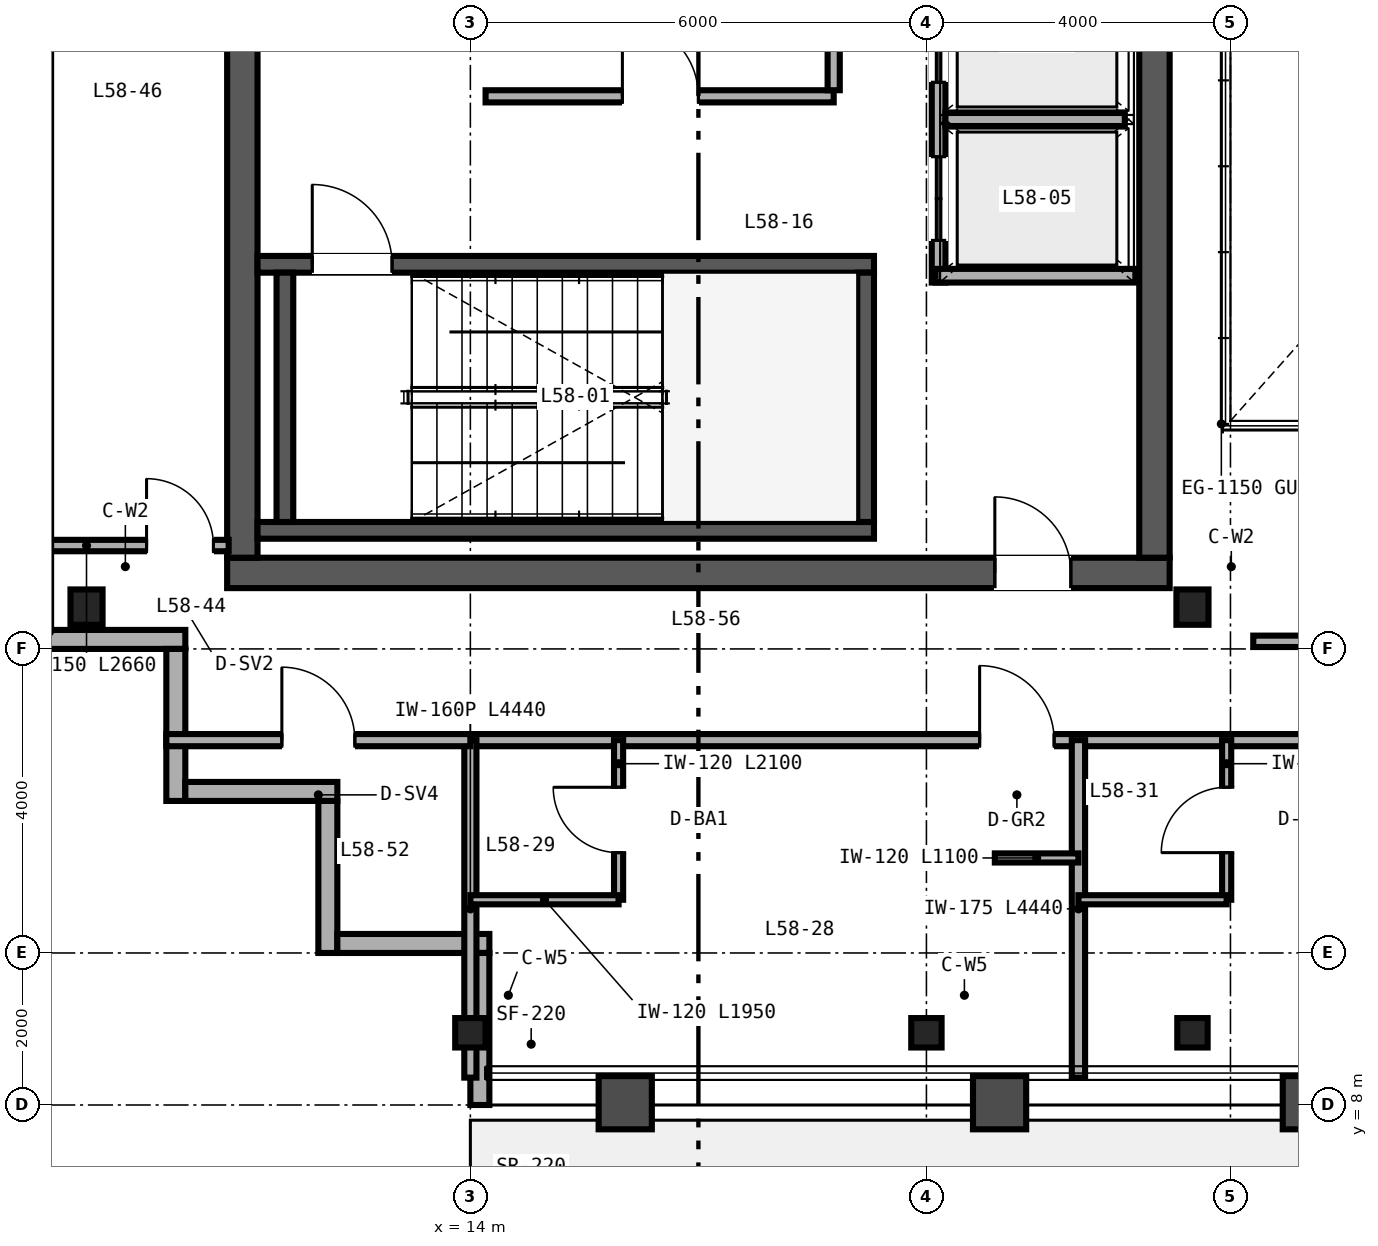
"""IFC4 building model, lengths in metres.
Left out: names, types, materials, properties, quantities, classifications, styles, units other than length and angle.
Written with IfcOpenShell. Run it as: python <this file> out.ifc"""

import sys

from ifc_helpers import new_model, si_unit, direction, frame, frame_2d, origin, origin_2d, place, context, subcontext, project, spatial, rectangle, i_section, extrude, source, transform, mapped, element, fill, save


model = new_model("IFC4")
c1 = context("Model", 3, precision=1e-05, world=origin(), true_north=direction((0.0, 1.0)))
c2 = subcontext(c1, "Body", "Model", "MODEL_VIEW")
j1 = project(units=[si_unit("LENGTHUNIT", "METRE"), si_unit("PLANEANGLEUNIT", "RADIAN")], contexts=[c1])
p1 = place(None, origin())
s1 = spatial("IfcSite", under=j1, at=p1, CompositionType="ELEMENT")
p2 = place(p1, origin())
s2 = spatial("IfcBuilding", under=s1, at=p2, CompositionType="ELEMENT")
p3 = place(p2, frame((0.0, 0.0, 232.8)))
s3 = spatial("IfcBuildingStorey", under=s2, at=p3, CompositionType="ELEMENT", Elevation=232.8)
p4 = place(p3, frame((10.8, 15.0, 0.0), z_axis=(0.0, 0.0, 1.0), x_axis=(1.0, 0.0, 0.0)))
e1 = element("IfcWall", 1, at=p4, inside=s3, PredefinedType="SHEAR", context=c2, shape_type="SweptSolid", body=[
    extrude(rectangle(XDim=12.4, YDim=0.4, at=frame_2d((6.2, 0.0))), origin(), (0.0, 0.0, 1.0), 3.38),
])
p5 = place(p4, frame((10.1, 0.0, 0.0)))
e2 = element("IfcOpeningElement", 2, at=p5, cuts=e1, PredefinedType="OPENING", context=c2, shape_type="SweptSolid", body=[
    extrude(rectangle(XDim=1.0, YDim=2.15, at=frame_2d((0.5, 1.075))), frame((0.0, 0.21, 0.0), z_axis=(0.0, -1.0, 0.0), x_axis=(1.0, 0.0, 0.0)), (0.0, 0.0, 1.0), 0.42),
])
for number, where, z_axis, x_axis in (
    (3, (11.0, 15.2, 0.0), (0.0, 0.0, 1.0), (0.0, 1.0, 0.0)),
    (4, (23.0, 15.2, 0.0), (0.0, 0.0, 1.0), (0.0, 1.0, 0.0)),
):
    element("IfcWall", number, at=place(p3, frame(where, z_axis=z_axis, x_axis=x_axis)), inside=s3, PredefinedType="SHEAR", context=c2, shape_type="SweptSolid", body=[
        extrude(rectangle(XDim=21.6, YDim=0.4, at=frame_2d((10.8, 0.0))), origin(), (0.0, 0.0, 1.0), 3.38),
    ])
p6 = place(p3, frame((11.2, 15.56, 0.0), z_axis=(0.0, 0.0, 1.0), x_axis=(1.0, 0.0, 0.0)))
e5 = element("IfcWall", 5, at=p6, inside=s3, PredefinedType="SHEAR", context=c2, shape_type="SweptSolid", body=[
    extrude(rectangle(XDim=8.11, YDim=0.22, at=frame_2d((4.055, 0.0))), origin(), (0.0, 0.0, 1.0), 3.4),
])
p7 = place(p3, frame((11.2, 19.06, 0.0), z_axis=(0.0, 0.0, 1.0), x_axis=(1.0, 0.0, 0.0)))
e6 = element("IfcWall", 6, at=p7, inside=s3, PredefinedType="SHEAR", context=c2, shape_type="SweptSolid", body=[
    extrude(rectangle(XDim=8.11, YDim=0.22, at=frame_2d((4.055, 0.0))), origin(), (0.0, 0.0, 1.0), 3.4),
])
p8 = place(p7, frame((0.72, 0.0, 0.0)))
e7 = element("IfcOpeningElement", 7, at=p8, cuts=e6, PredefinedType="OPENING", context=c2, shape_type="SweptSolid", body=[
    extrude(rectangle(XDim=1.05, YDim=2.15, at=frame_2d((0.525, 1.075))), frame((0.0, 0.12, 0.0), z_axis=(0.0, -1.0, 0.0), x_axis=(1.0, 0.0, 0.0)), (0.0, 0.0, 1.0), 0.24),
])
for number, where, z_axis, x_axis in (
    (8, (11.56, 15.67, 0.0), (0.0, 0.0, 1.0), (0.0, 1.0, 0.0)),
    (9, (19.2, 15.67, 0.0), (0.0, 0.0, 1.0), (0.0, 1.0, 0.0)),
):
    element("IfcWall", number, at=place(p3, frame(where, z_axis=z_axis, x_axis=x_axis)), inside=s3, PredefinedType="SHEAR", context=c2, shape_type="SweptSolid", body=[
        extrude(rectangle(XDim=3.28, YDim=0.22, at=frame_2d((1.64, 0.0))), origin(), (0.0, 0.0, 1.0), 3.4),
    ])
m1 = source(origin(), c2, "Body", "SweptSolid", [
    extrude(i_section(OverallWidth=0.422, OverallDepth=0.465, WebThickness=0.045, FlangeThickness=0.073, FilletRadius=0.025, at=origin_2d()), origin(), (0.0, 0.0, 1.0), 3.38),
])
for number, where, z_axis, x_axis in (
    (10, (8.95, 14.55, 0.0), (0.0, 0.0, 1.0), (1.0, 0.0, 0.0)),
    (11, (23.5, 14.55, 0.0), (0.0, 0.0, 1.0), (1.0, 0.0, 0.0)),
):
    element("IfcColumn", number, at=place(p3, frame(where, z_axis=z_axis, x_axis=x_axis)), inside=s3, PredefinedType="COLUMN", context=c2, shape_type="MappedRepresentation", body=[
        mapped(m1, transform((0.0, 0.0, 0.0), scale=1.0)),
    ])
m2 = source(origin(), c2, "Body", "SweptSolid", [
    extrude(i_section(OverallWidth=0.399, OverallDepth=0.387, WebThickness=0.021, FlangeThickness=0.033, FilletRadius=0.025, at=origin_2d()), origin(), (0.0, 0.0, 1.0), 3.38),
])
for number, where, z_axis, x_axis in (
    (12, (14.0, 8.95, 0.0), (0.0, 0.0, 1.0), (1.0, 0.0, 0.0)),
    (13, (20.0, 8.95, 0.0), (0.0, 0.0, 1.0), (1.0, 0.0, 0.0)),
    (14, (23.5, 8.95, 0.0), (0.0, 0.0, 1.0), (1.0, 0.0, 0.0)),
):
    element("IfcColumn", number, at=place(p3, frame(where, z_axis=z_axis, x_axis=x_axis)), inside=s3, PredefinedType="COLUMN", context=c2, shape_type="MappedRepresentation", body=[
        mapped(m2, transform((0.0, 0.0, 0.0), scale=1.0)),
    ])
p9 = place(p3, frame((8.0, 14.125, 0.0), z_axis=(0.0, 0.0, 1.0), x_axis=(1.0, 0.0, 0.0)))
e15 = element("IfcWall", 15, at=p9, inside=s3, PredefinedType="SOLIDWALL", context=c2, shape_type="SweptSolid", body=[
    extrude(rectangle(XDim=2.25, YDim=0.25, at=frame_2d((1.125, 0.0))), origin(), (0.0, 0.0, 1.0), 3.38),
])
for number, where, z_axis, x_axis in (
    (16, (10.125, 14.0, 0.0), (0.0, 0.0, 1.0), (0.0, -1.0, 0.0)),
    (17, (10.25, 12.125, 0.0), (0.0, 0.0, 1.0), (1.0, 0.0, 0.0)),
    (18, (12.125, 12.0, 0.0), (0.0, 0.0, 1.0), (0.0, -1.0, 0.0)),
    (19, (12.25, 10.125, 0.0), (0.0, 0.0, 1.0), (1.0, 0.0, 0.0)),
):
    element("IfcWall", number, at=place(p3, frame(where, z_axis=z_axis, x_axis=x_axis)), inside=s3, PredefinedType="SOLIDWALL", context=c2, shape_type="SweptSolid", body=[
        extrude(rectangle(XDim=2.0, YDim=0.25, at=frame_2d((1.0, 0.0))), origin(), (0.0, 0.0, 1.0), 3.38),
    ])
p10 = place(p3, frame((14.125, 10.0, 0.0), z_axis=(0.0, 0.0, 1.0), x_axis=(0.0, -1.0, 0.0)))
e20 = element("IfcWall", 20, at=p10, inside=s3, PredefinedType="SOLIDWALL", context=c2, shape_type="SweptSolid", body=[
    extrude(rectangle(XDim=2.0, YDim=0.25, at=frame_2d((1.0, 0.0))), origin(), (0.0, 0.0, 1.0), 2.687),
])
p11 = place(p3, frame((20.16, 18.82, 0.0), z_axis=(0.0, 0.0, 1.0), x_axis=(0.0, 1.0, 0.0)))
e21 = element("IfcWall", 21, at=p11, inside=s3, PredefinedType="SOLIDWALL", context=c2, shape_type="SweptSolid", body=[
    extrude(rectangle(XDim=6.32, YDim=0.18, at=frame_2d((3.16, 0.0))), origin(), (0.0, 0.0, 1.0), 2.48),
])
p12 = place(p11, frame((0.555, 0.0, 0.0)))
e22 = element("IfcOpeningElement", 22, at=p12, cuts=e21, PredefinedType="OPENING", context=c2, shape_type="SweptSolid", body=[
    extrude(rectangle(XDim=1.1, YDim=2.2, at=frame_2d((0.55, 1.1))), frame((0.0, 0.1, 0.0), z_axis=(0.0, -1.0, 0.0), x_axis=(1.0, 0.0, 0.0)), (0.0, 0.0, 1.0), 0.2),
])
p13 = place(p11, frame((2.635, 0.0, 0.0)))
e23 = element("IfcOpeningElement", 23, at=p13, cuts=e21, PredefinedType="OPENING", context=c2, shape_type="SweptSolid", body=[
    extrude(rectangle(XDim=1.1, YDim=2.2, at=frame_2d((0.55, 1.1))), frame((0.0, 0.1, 0.0), z_axis=(0.0, -1.0, 0.0), x_axis=(1.0, 0.0, 0.0)), (0.0, 0.0, 1.0), 0.2),
])
p14 = place(p11, frame((4.69, 0.0, 0.0)))
e24 = element("IfcOpeningElement", 24, at=p14, cuts=e21, PredefinedType="OPENING", context=c2, shape_type="SweptSolid", body=[
    extrude(rectangle(XDim=1.1, YDim=2.2, at=frame_2d((0.55, 1.1))), frame((0.0, 0.1, 0.0), z_axis=(0.0, -1.0, 0.0), x_axis=(1.0, 0.0, 0.0)), (0.0, 0.0, 1.0), 0.2),
])
p15 = place(p3, frame((20.12, 18.91, 0.0), z_axis=(0.0, 0.0, 1.0), x_axis=(1.0, 0.0, 0.0)))
e25 = element("IfcWall", 25, at=p15, inside=s3, PredefinedType="SOLIDWALL", context=c2, shape_type="SweptSolid", body=[
    extrude(rectangle(XDim=2.63, YDim=0.18, at=frame_2d((1.315, 0.0))), origin(), (0.0, 0.0, 1.0), 3.38),
])
p16 = place(p3, frame((20.25, 20.965, 0.0), z_axis=(0.0, 0.0, 1.0), x_axis=(1.0, 0.0, 0.0)))
e26 = element("IfcWall", 26, at=p16, inside=s3, PredefinedType="SOLIDWALL", context=c2, shape_type="SweptSolid", body=[
    extrude(rectangle(XDim=2.36, YDim=0.18, at=frame_2d((1.18, 0.0))), origin(), (0.0, 0.0, 1.0), 2.48),
])
p17 = place(p3, frame((14.2, 21.27, 0.0), z_axis=(0.0, 0.0, 1.0), x_axis=(1.0, 0.0, 0.0)))
e27 = element("IfcWall", 27, at=p17, inside=s3, PredefinedType="PARTITIONING", context=c2, shape_type="SweptSolid", body=[
    extrude(rectangle(XDim=4.58, YDim=0.16, at=frame_2d((2.29, 0.0))), origin(), (0.0, 0.0, 1.0), 3.38),
])
p18 = place(p17, frame((1.8, 0.0, 0.0)))
e28 = element("IfcOpeningElement", 28, at=p18, cuts=e27, PredefinedType="OPENING", context=c2, shape_type="SweptSolid", body=[
    extrude(rectangle(XDim=1.0, YDim=2.15, at=frame_2d((0.5, 1.075))), frame((0.0, 0.09, 0.0), z_axis=(0.0, -1.0, 0.0), x_axis=(1.0, 0.0, 0.0)), (0.0, 0.0, 1.0), 0.18),
])
p19 = place(p3, frame((18.78, 21.35, 0.0), z_axis=(0.0, 0.0, 1.0), x_axis=(0.0, 1.0, 0.0)))
e29 = element("IfcWall", 29, at=p19, inside=s3, PredefinedType="PARTITIONING", context=c2, shape_type="SweptSolid", body=[
    extrude(rectangle(XDim=3.81, YDim=0.16, at=frame_2d((1.905, 0.0))), origin(), (0.0, 0.0, 1.0), 3.38),
])
p20 = place(p3, frame((24.3, 14.1, 0.0), z_axis=(0.0, 0.0, 1.0), x_axis=(1.0, 0.0, 0.0)))
e30 = element("IfcWall", 30, at=p20, inside=s3, PredefinedType="PARTITIONING", context=c2, shape_type="SweptSolid", body=[
    extrude(rectangle(XDim=15.4, YDim=0.15, at=frame_2d((7.7, 0.0))), origin(), (0.0, 0.0, 1.0), 3.38),
])
p21 = place(p20, frame((7.0, 0.0, 0.0)))
e31 = element("IfcOpeningElement", 31, at=p21, cuts=e30, PredefinedType="OPENING", context=c2, shape_type="SweptSolid", body=[
    extrude(rectangle(XDim=0.96, YDim=2.15, at=frame_2d((0.48, 1.075))), frame((0.0, 0.085, 0.0), z_axis=(0.0, -1.0, 0.0), x_axis=(1.0, 0.0, 0.0)), (0.0, 0.0, 1.0), 0.17),
])
p22 = place(p3, frame((14.0, 12.8, 0.0), z_axis=(0.0, 0.0, 1.0), x_axis=(1.0, 0.0, 0.0)))
e32 = element("IfcWall", 32, at=p22, inside=s3, PredefinedType="PARTITIONING", context=c2, shape_type="SweptSolid", body=[
    extrude(rectangle(XDim=36.0, YDim=0.16, at=frame_2d((18.0, 0.0))), origin(), (0.0, 0.0, 1.0), 2.923),
])
p23 = place(p22, frame((6.7, 0.0, 0.0)))
e33 = element("IfcOpeningElement", 33, at=p23, cuts=e32, PredefinedType="OPENING", context=c2, shape_type="SweptSolid", body=[
    extrude(rectangle(XDim=0.98, YDim=2.2, at=frame_2d((0.49, 1.1))), frame((0.0, 0.09, 0.0), z_axis=(0.0, -1.0, 0.0), x_axis=(1.0, 0.0, 0.0)), (0.0, 0.0, 1.0), 0.18),
])
p24 = place(p22, frame((15.2, 0.0, 0.0)))
e34 = element("IfcOpeningElement", 34, at=p24, cuts=e32, PredefinedType="OPENING", context=c2, shape_type="SweptSolid", body=[
    extrude(rectangle(XDim=0.98, YDim=2.2, at=frame_2d((0.49, 1.1))), frame((0.0, 0.09, 0.0), z_axis=(0.0, -1.0, 0.0), x_axis=(1.0, 0.0, 0.0)), (0.0, 0.0, 1.0), 0.18),
])
p25 = place(p22, frame((24.2, 0.0, 0.0)))
e35 = element("IfcOpeningElement", 35, at=p25, cuts=e32, PredefinedType="OPENING", context=c2, shape_type="SweptSolid", body=[
    extrude(rectangle(XDim=0.98, YDim=2.2, at=frame_2d((0.49, 1.1))), frame((0.0, 0.09, 0.0), z_axis=(0.0, -1.0, 0.0), x_axis=(1.0, 0.0, 0.0)), (0.0, 0.0, 1.0), 0.18),
])
p26 = place(p22, frame((29.74, 0.0, 0.0)))
e36 = element("IfcOpeningElement", 36, at=p26, cuts=e32, PredefinedType="OPENING", context=c2, shape_type="SweptSolid", body=[
    extrude(rectangle(XDim=0.94, YDim=2.15, at=frame_2d((0.47, 1.075))), frame((0.0, 0.09, 0.0), z_axis=(0.0, -1.0, 0.0), x_axis=(1.0, 0.0, 0.0)), (0.0, 0.0, 1.0), 0.18),
])
p27 = place(p22, frame((34.74, 0.0, 0.0)))
e37 = element("IfcOpeningElement", 37, at=p27, cuts=e32, PredefinedType="OPENING", context=c2, shape_type="SweptSolid", body=[
    extrude(rectangle(XDim=0.94, YDim=2.15, at=frame_2d((0.47, 1.075))), frame((0.0, 0.09, 0.0), z_axis=(0.0, -1.0, 0.0), x_axis=(1.0, 0.0, 0.0)), (0.0, 0.0, 1.0), 0.18),
])
p28 = place(p3, frame((14.0, 8.36, 0.0), z_axis=(0.0, 0.0, 1.0), x_axis=(0.0, 1.0, 0.0)))
e38 = element("IfcWall", 38, at=p28, inside=s3, PredefinedType="PARTITIONING", context=c2, shape_type="SweptSolid", body=[
    extrude(rectangle(XDim=4.44, YDim=0.16, at=frame_2d((2.22, 0.0))), origin(), (0.0, 0.0, 1.0), 2.687),
])
p29 = place(p3, frame((22.0, 8.36, 0.0), z_axis=(0.0, 0.0, 1.0), x_axis=(0.0, 1.0, 0.0)))
e39 = element("IfcWall", 39, at=p29, inside=s3, PredefinedType="PARTITIONING", context=c2, shape_type="SweptSolid", body=[
    extrude(rectangle(XDim=4.44, YDim=0.175, at=frame_2d((2.22, 0.0))), origin(), (0.0, 0.0, 1.0), 2.843),
])
p30 = place(p3, frame((15.95, 10.7, 0.0), z_axis=(0.0, 0.0, 1.0), x_axis=(0.0, 1.0, 0.0)))
e40 = element("IfcWall", 40, at=p30, inside=s3, PredefinedType="PARTITIONING", context=c2, shape_type="SweptSolid", body=[
    extrude(rectangle(XDim=2.1, YDim=0.12, at=frame_2d((1.05, 0.0))), origin(), (0.0, 0.0, 1.0), 3.38),
])
p31 = place(p30, frame((0.62, 0.0, 0.0)))
e41 = element("IfcOpeningElement", 41, at=p31, cuts=e40, PredefinedType="OPENING", context=c2, shape_type="SweptSolid", body=[
    extrude(rectangle(XDim=0.86, YDim=2.1, at=frame_2d((0.43, 1.05))), frame((0.0, 0.07, 0.0), z_axis=(0.0, -1.0, 0.0), x_axis=(1.0, 0.0, 0.0)), (0.0, 0.0, 1.0), 0.14),
])
p32 = place(p3, frame((14.0, 10.7, 0.0), z_axis=(0.0, 0.0, 1.0), x_axis=(1.0, 0.0, 0.0)))
e42 = element("IfcWall", 42, at=p32, inside=s3, PredefinedType="PARTITIONING", context=c2, shape_type="SweptSolid", body=[
    extrude(rectangle(XDim=1.95, YDim=0.12, at=frame_2d((0.975, 0.0))), origin(), (0.0, 0.0, 1.0), 3.38),
])
p33 = place(p3, frame((20.9, 11.25, 0.0), z_axis=(0.0, 0.0, 1.0), x_axis=(1.0, 0.0, 0.0)))
e43 = element("IfcWall", 43, at=p33, inside=s3, PredefinedType="PARTITIONING", context=c2, shape_type="SweptSolid", body=[
    extrude(rectangle(XDim=1.1, YDim=0.12, at=frame_2d((0.55, 0.0))), origin(), (0.0, 0.0, 1.0), 3.38),
])
p34 = place(p3, frame((23.95, 10.7, 0.0), z_axis=(0.0, 0.0, 1.0), x_axis=(0.0, 1.0, 0.0)))
e44 = element("IfcWall", 44, at=p34, inside=s3, PredefinedType="PARTITIONING", context=c2, shape_type="SweptSolid", body=[
    extrude(rectangle(XDim=2.1, YDim=0.12, at=frame_2d((1.05, 0.0))), origin(), (0.0, 0.0, 1.0), 3.38),
])
p35 = place(p34, frame((0.62, 0.0, 0.0)))
e45 = element("IfcOpeningElement", 45, at=p35, cuts=e44, PredefinedType="OPENING", context=c2, shape_type="SweptSolid", body=[
    extrude(rectangle(XDim=0.86, YDim=2.1, at=frame_2d((0.43, 1.05))), frame((0.0, 0.07, 0.0), z_axis=(0.0, -1.0, 0.0), x_axis=(1.0, 0.0, 0.0)), (0.0, 0.0, 1.0), 0.14),
])
p36 = place(p3, frame((22.0, 10.7, 0.0), z_axis=(0.0, 0.0, 1.0), x_axis=(1.0, 0.0, 0.0)))
e46 = element("IfcWall", 46, at=p36, inside=s3, PredefinedType="PARTITIONING", context=c2, shape_type="SweptSolid", body=[
    extrude(rectangle(XDim=1.95, YDim=0.12, at=frame_2d((0.975, 0.0))), origin(), (0.0, 0.0, 1.0), 2.923),
])
p37 = place(p3, frame((8.16, 15.36, 0.0), z_axis=(0.0, 0.0, 1.0), x_axis=(1.0, 0.0, 0.0)))
e47 = element("IfcWall", 47, at=p37, inside=s3, PredefinedType="PARTITIONING", context=c2, shape_type="SweptSolid", body=[
    extrude(rectangle(XDim=2.66, YDim=0.15, at=frame_2d((1.33, 0.0))), origin(), (0.0, 0.0, 1.0), 2.601),
])
p38 = place(p37, frame((1.58, 0.0, 0.0)))
e48 = element("IfcOpeningElement", 48, at=p38, cuts=e47, PredefinedType="OPENING", context=c2, shape_type="SweptSolid", body=[
    extrude(rectangle(XDim=0.88, YDim=2.15, at=frame_2d((0.44, 1.075))), frame((0.0, 0.085, 0.0), z_axis=(0.0, -1.0, 0.0), x_axis=(1.0, 0.0, 0.0)), (0.0, 0.0, 1.0), 0.17),
])
p39 = place(p3, frame((10.0, 12.8, 0.0), z_axis=(0.0, 0.0, 1.0), x_axis=(1.0, 0.0, 0.0)))
e49 = element("IfcWall", 49, at=p39, inside=s3, PredefinedType="PARTITIONING", context=c2, shape_type="SweptSolid", body=[
    extrude(rectangle(XDim=4.0, YDim=0.16, at=frame_2d((2.0, 0.0))), origin(), (0.0, 0.0, 1.0), 3.38),
])
p40 = place(p39, frame((1.52, 0.0, 0.0)))
e50 = element("IfcOpeningElement", 50, at=p40, cuts=e49, PredefinedType="OPENING", context=c2, shape_type="SweptSolid", body=[
    extrude(rectangle(XDim=0.96, YDim=2.15, at=frame_2d((0.48, 1.075))), frame((0.0, 0.09, 0.0), z_axis=(0.0, -1.0, 0.0), x_axis=(1.0, 0.0, 0.0)), (0.0, 0.0, 1.0), 0.18),
])
m3 = source(origin(), c2, "Body", "SweptSolid", [
    extrude(rectangle(XDim=1.05, YDim=2.15, at=frame_2d((0.525, 1.075))), frame((0.0, 0.025, 0.0), z_axis=(0.0, -1.0, 0.0), x_axis=(1.0, 0.0, 0.0)), (0.0, 0.0, 1.0), 0.05),
])
p41 = place(p8, origin())
e51 = element("IfcDoor", 51, at=p41, inside=s3, OperationType="SINGLE_SWING_LEFT", PredefinedType="DOOR", context=c2, shape_type="MappedRepresentation", body=[
    mapped(m3, transform((0.0, 0.0, 0.0), scale=1.0)),
])
fill(e7, e51)
m4 = source(origin(), c2, "Body", "SweptSolid", [
    extrude(rectangle(XDim=1.1, YDim=2.2, at=frame_2d((0.55, 1.1))), frame((0.0, 0.025, 0.0), z_axis=(0.0, -1.0, 0.0), x_axis=(1.0, 0.0, 0.0)), (0.0, 0.0, 1.0), 0.05),
])
p42 = place(p12, origin())
e52 = element("IfcDoor", 52, at=p42, inside=s3, OperationType="DOUBLE_DOOR_SLIDING", PredefinedType="DOOR", context=c2, shape_type="MappedRepresentation", body=[
    mapped(m4, transform((0.0, 0.0, 0.0), scale=1.0)),
])
fill(e22, e52)
p43 = place(p13, origin())
e53 = element("IfcDoor", 53, at=p43, inside=s3, OperationType="DOUBLE_DOOR_SLIDING", PredefinedType="DOOR", context=c2, shape_type="MappedRepresentation", body=[
    mapped(m4, transform((0.0, 0.0, 0.0), scale=1.0)),
])
fill(e23, e53)
m5 = source(origin(), c2, "Body", "SweptSolid", [
    extrude(rectangle(XDim=1.0, YDim=2.15, at=frame_2d((0.5, 1.075))), frame((0.0, 0.025, 0.0), z_axis=(0.0, -1.0, 0.0), x_axis=(1.0, 0.0, 0.0)), (0.0, 0.0, 1.0), 0.05),
])
p44 = place(p18, origin())
e54 = element("IfcDoor", 54, at=p44, inside=s3, OperationType="SINGLE_SWING_LEFT", PredefinedType="DOOR", context=c2, shape_type="MappedRepresentation", body=[
    mapped(m5, transform((0.0, 0.0, 0.0), scale=1.0)),
])
fill(e28, e54)
p45 = place(p5, origin())
e55 = element("IfcDoor", 55, at=p45, inside=s3, OperationType="SINGLE_SWING_LEFT", PredefinedType="DOOR", context=c2, shape_type="MappedRepresentation", body=[
    mapped(m5, transform((0.0, 0.0, 0.0), scale=1.0)),
])
fill(e2, e55)
m6 = source(origin(), c2, "Body", "SweptSolid", [
    extrude(rectangle(XDim=0.86, YDim=2.1, at=frame_2d((0.43, 1.05))), frame((0.0, 0.025, 0.0), z_axis=(0.0, -1.0, 0.0), x_axis=(1.0, 0.0, 0.0)), (0.0, 0.0, 1.0), 0.05),
])
p46 = place(p31, origin())
e56 = element("IfcDoor", 56, at=p46, inside=s3, OperationType="SINGLE_SWING_RIGHT", PredefinedType="DOOR", context=c2, shape_type="MappedRepresentation", body=[
    mapped(m6, transform((0.0, 0.0, 0.0), scale=1.0)),
])
fill(e41, e56)
p47 = place(p35, origin())
e57 = element("IfcDoor", 57, at=p47, inside=s3, OperationType="SINGLE_SWING_LEFT", PredefinedType="DOOR", context=c2, shape_type="MappedRepresentation", body=[
    mapped(m6, transform((0.0, 0.0, 0.0), scale=1.0)),
])
fill(e45, e57)
m7 = source(origin(), c2, "Body", "SweptSolid", [
    extrude(rectangle(XDim=0.98, YDim=2.2, at=frame_2d((0.49, 1.1))), frame((0.0, 0.025, 0.0), z_axis=(0.0, -1.0, 0.0), x_axis=(1.0, 0.0, 0.0)), (0.0, 0.0, 1.0), 0.05),
])
p48 = place(p23, origin())
e58 = element("IfcDoor", 58, at=p48, inside=s3, OperationType="SINGLE_SWING_LEFT", PredefinedType="DOOR", context=c2, shape_type="MappedRepresentation", body=[
    mapped(m7, transform((0.0, 0.0, 0.0), scale=1.0)),
])
fill(e33, e58)
m8 = source(origin(), c2, "Body", "SweptSolid", [
    extrude(rectangle(XDim=0.88, YDim=2.15, at=frame_2d((0.44, 1.075))), frame((0.0, 0.025, 0.0), z_axis=(0.0, -1.0, 0.0), x_axis=(1.0, 0.0, 0.0)), (0.0, 0.0, 1.0), 0.05),
])
p49 = place(p38, origin())
e59 = element("IfcDoor", 59, at=p49, inside=s3, OperationType="SINGLE_SWING_LEFT", PredefinedType="DOOR", context=c2, shape_type="MappedRepresentation", body=[
    mapped(m8, transform((0.0, 0.0, 0.0), scale=1.0)),
])
fill(e48, e59)
m9 = source(origin(), c2, "Body", "SweptSolid", [
    extrude(rectangle(XDim=0.96, YDim=2.15, at=frame_2d((0.48, 1.075))), frame((0.0, 0.025, 0.0), z_axis=(0.0, -1.0, 0.0), x_axis=(1.0, 0.0, 0.0)), (0.0, 0.0, 1.0), 0.05),
])
p50 = place(p40, origin())
e60 = element("IfcDoor", 60, at=p50, inside=s3, OperationType="SINGLE_SWING_LEFT", PredefinedType="DOOR", context=c2, shape_type="MappedRepresentation", body=[
    mapped(m9, transform((0.0, 0.0, 0.0), scale=1.0)),
])
fill(e50, e60)
save(model, sys.argv[1])
